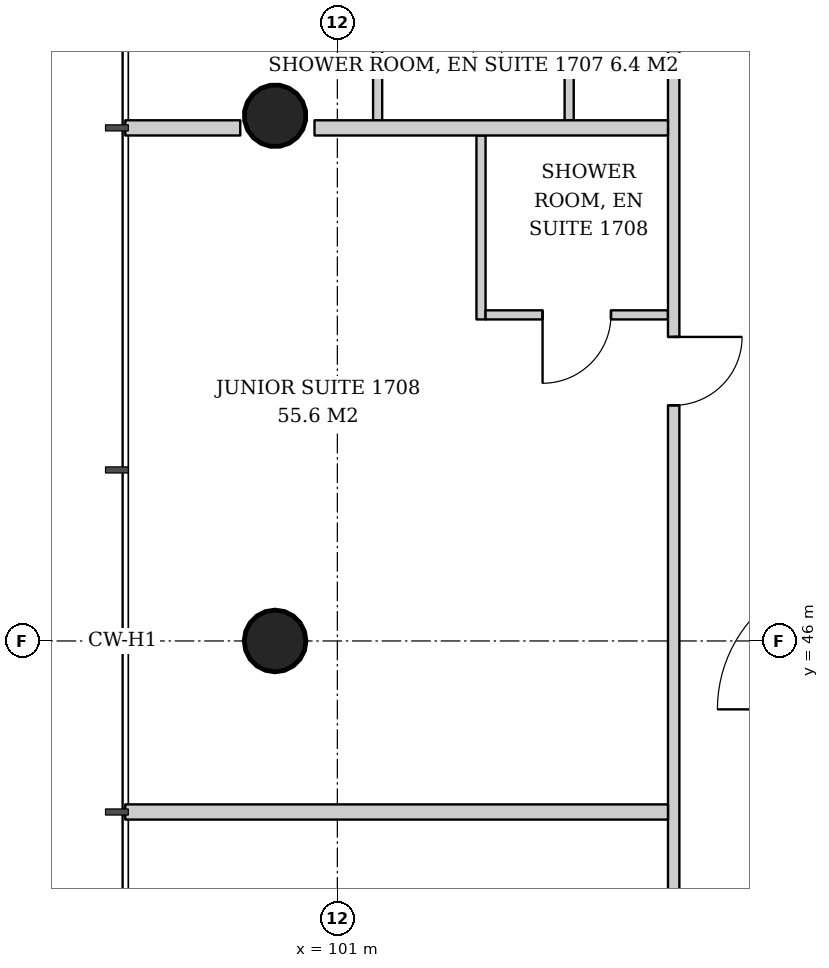
"""IFC4 building model, lengths in metres.
Left out: names, types, materials, properties, quantities, classifications, styles, units other than length and angle.
Written with IfcOpenShell. Run it as: python <this file> out.ifc"""

import sys

from ifc_helpers import new_model, si_unit, direction, frame, frame_2d, origin, origin_2d, place, context, subcontext, project, spatial, rectangle, hollow_circle, extrude, element, fill, save


model = new_model("IFC4")
c1 = context("Model", 3, precision=1e-05, world=origin(), true_north=direction((0.0, 1.0)))
c2 = subcontext(c1, "Body", "Model", "MODEL_VIEW")
j1 = project(units=[si_unit("LENGTHUNIT", "METRE"), si_unit("PLANEANGLEUNIT", "RADIAN")], contexts=[c1])
p1 = place(None, origin())
s1 = spatial("IfcSite", under=j1, at=p1, CompositionType="ELEMENT")
p2 = place(p1, origin())
s2 = spatial("IfcBuilding", under=s1, at=p2, CompositionType="ELEMENT")
p3 = place(p2, frame((0.0, 0.0, 70.4)))
s3 = spatial("IfcBuildingStorey", under=s2, at=p3, CompositionType="ELEMENT", Elevation=70.4)
p4 = place(p3, frame((100.129, 52.935, 0.0), z_axis=(0.043059584825, -0.021497706284, 0.998841188968), x_axis=(0.446680166538, 0.894693706707, 0.0)))
e1 = element("IfcColumn", 1, at=p4, inside=s3, PredefinedType="COLUMN", context=c2, shape_type="SweptSolid", body=[
    extrude(hollow_circle(Radius=0.406, WallThickness=0.03, at=origin_2d()), origin(), (0.0, 0.0, 1.0), 3.804),
])
p5 = place(p3, frame((100.129, 46.0, 0.0), z_axis=(0.043069538298, 0.0, 0.999072076915), x_axis=(0.0, 1.0, 0.0)))
e2 = element("IfcColumn", 2, at=p5, inside=s3, PredefinedType="COLUMN", context=c2, shape_type="SweptSolid", body=[
    extrude(hollow_circle(Radius=0.406, WallThickness=0.03, at=origin_2d()), origin(), (0.0, 0.0, 1.0), 3.803),
])
p6 = place(p3, frame((104.05, 52.85, 0.0), z_axis=(0.0, 0.0, 1.0), x_axis=(0.0, 1.0, 0.0)))
e3 = element("IfcWall", 3, at=p6, inside=s3, PredefinedType="PARTITIONING", context=c2, shape_type="SweptSolid", body=[
    extrude(rectangle(XDim=2.58, YDim=0.12, at=frame_2d((1.29, 0.0))), origin(), (0.0, 0.0, 1.0), 2.8),
])
p7 = place(p6, frame((0.75, 0.0, 0.0)))
e4 = element("IfcOpeningElement", 4, at=p7, cuts=e3, PredefinedType="OPENING", context=c2, shape_type="SweptSolid", body=[
    extrude(rectangle(XDim=0.9, YDim=2.1, at=frame_2d((0.45, 1.05))), frame((0.0, 0.07, 0.0), z_axis=(0.0, -1.0, 0.0), x_axis=(1.0, 0.0, 0.0)), (0.0, 0.0, 1.0), 0.14),
])
p8 = place(p3, frame((101.53, 52.85, 0.0), z_axis=(0.0, 0.0, 1.0), x_axis=(0.0, 1.0, 0.0)))
e5 = element("IfcWall", 5, at=p8, inside=s3, PredefinedType="PARTITIONING", context=c2, shape_type="SweptSolid", body=[
    extrude(rectangle(XDim=2.58, YDim=0.12, at=frame_2d((1.29, 0.0))), origin(), (0.0, 0.0, 1.0), 2.8),
])
p9 = place(p3, frame((102.89, 52.65, 0.0), z_axis=(0.0, 0.0, 1.0), x_axis=(0.0, -1.0, 0.0)))
e6 = element("IfcWall", 6, at=p9, inside=s3, PredefinedType="PARTITIONING", context=c2, shape_type="SweptSolid", body=[
    extrude(rectangle(XDim=2.42, YDim=0.12, at=frame_2d((1.21, 0.0))), origin(), (0.0, 0.0, 1.0), 2.847),
])
p10 = place(p3, frame((105.35, 50.29, 0.0), z_axis=(0.0, 0.0, 1.0), x_axis=(-1.0, 0.0, 0.0)))
e7 = element("IfcWall", 7, at=p10, inside=s3, PredefinedType="PARTITIONING", context=c2, shape_type="SweptSolid", body=[
    extrude(rectangle(XDim=2.4, YDim=0.12, at=frame_2d((1.2, 0.0))), origin(), (0.0, 0.0, 1.0), 3.6),
])
p11 = place(p10, frame((0.75, 0.0, 0.0)))
e8 = element("IfcOpeningElement", 8, at=p11, cuts=e7, PredefinedType="OPENING", context=c2, shape_type="SweptSolid", body=[
    extrude(rectangle(XDim=0.9, YDim=2.1, at=frame_2d((0.45, 1.05))), frame((0.0, 0.07, 0.0), z_axis=(0.0, -1.0, 0.0), x_axis=(1.0, 0.0, 0.0)), (0.0, 0.0, 1.0), 0.14),
])
p12 = place(p3, frame((105.425, 57.65, 0.0), z_axis=(0.0, 0.0, 1.0), x_axis=(0.0, -1.0, 0.0)))
e9 = element("IfcWall", 9, at=p12, inside=s3, PredefinedType="PARTITIONING", context=c2, shape_type="SweptSolid", body=[
    extrude(rectangle(XDim=23.15, YDim=0.15, at=frame_2d((11.575, 0.0))), origin(), (0.0, 0.0, 1.0), 2.8),
])
p13 = place(p12, frame((2.025, 0.0, 0.0)))
e10 = element("IfcOpeningElement", 10, at=p13, cuts=e9, PredefinedType="OPENING", context=c2, shape_type="SweptSolid", body=[
    extrude(rectangle(XDim=0.9, YDim=2.1, at=frame_2d((0.45, 1.05))), frame((0.0, 0.085, 0.0), z_axis=(0.0, -1.0, 0.0), x_axis=(1.0, 0.0, 0.0)), (0.0, 0.0, 1.0), 0.17),
])
p14 = place(p12, frame((7.65, 0.0, 0.0)))
e11 = element("IfcOpeningElement", 11, at=p14, cuts=e9, PredefinedType="OPENING", context=c2, shape_type="SweptSolid", body=[
    extrude(rectangle(XDim=0.9, YDim=2.1, at=frame_2d((0.45, 1.05))), frame((0.0, 0.085, 0.0), z_axis=(0.0, -1.0, 0.0), x_axis=(1.0, 0.0, 0.0)), (0.0, 0.0, 1.0), 0.17),
])
p15 = place(p12, frame((16.6, 0.0, 0.0)))
e12 = element("IfcOpeningElement", 12, at=p15, cuts=e9, PredefinedType="OPENING", context=c2, shape_type="SweptSolid", body=[
    extrude(rectangle(XDim=1.0, YDim=2.1, at=frame_2d((0.5, 1.05))), frame((0.0, 0.085, 0.0), z_axis=(0.0, -1.0, 0.0), x_axis=(1.0, 0.0, 0.0)), (0.0, 0.0, 1.0), 0.17),
])
p16 = place(p3, frame((105.35, 52.75, 0.0), z_axis=(0.0, 0.0, 1.0), x_axis=(-1.0, 0.0, 0.0)))
e13 = element("IfcWall", 13, at=p16, inside=s3, PredefinedType="PARTITIONING", context=c2, shape_type="SweptSolid", body=[
    extrude(rectangle(XDim=4.65, YDim=0.2, at=frame_2d((2.325, 0.0))), origin(), (0.0, 0.0, 1.0), 3.6),
])
p17 = place(p3, frame((99.723, 52.75, 0.0), z_axis=(0.0, 0.0, 1.0), x_axis=(-1.0, 0.0, 0.0)))
e14 = element("IfcWall", 14, at=p17, inside=s3, PredefinedType="PARTITIONING", context=c2, shape_type="SweptSolid", body=[
    extrude(rectangle(XDim=1.513, YDim=0.2, at=frame_2d((0.756, 0.0))), origin(), (0.0, 0.0, 1.0), 3.6),
])
p18 = place(p3, frame((105.35, 43.75, 0.0), z_axis=(0.0, 0.0, 1.0), x_axis=(-1.0, 0.0, 0.0)))
e15 = element("IfcWall", 15, at=p18, inside=s3, PredefinedType="PARTITIONING", context=c2, shape_type="SweptSolid", body=[
    extrude(rectangle(XDim=7.14, YDim=0.2, at=frame_2d((3.57, 0.0))), origin(), (0.0, 0.0, 1.0), 3.05),
])
p19 = place(p7, origin())
e16 = element("IfcDoor", 16, at=p19, inside=s3, OperationType="SINGLE_SWING_LEFT", PredefinedType="DOOR", context=c2, shape_type="SweptSolid", body=[
    extrude(rectangle(XDim=0.9, YDim=2.1, at=frame_2d((0.45, 1.05))), frame((0.0, 0.025, 0.0), z_axis=(0.0, -1.0, 0.0), x_axis=(1.0, 0.0, 0.0)), (0.0, 0.0, 1.0), 0.05),
])
fill(e4, e16)
p20 = place(p11, origin())
e17 = element("IfcDoor", 17, at=p20, inside=s3, OperationType="SINGLE_SWING_RIGHT", PredefinedType="DOOR", context=c2, shape_type="SweptSolid", body=[
    extrude(rectangle(XDim=0.9, YDim=2.1, at=frame_2d((0.45, 1.05))), frame((0.0, 0.025, 0.0), z_axis=(0.0, -1.0, 0.0), x_axis=(1.0, 0.0, 0.0)), (0.0, 0.0, 1.0), 0.05),
])
fill(e8, e17)
p21 = place(p14, origin())
e18 = element("IfcDoor", 18, at=p21, inside=s3, OperationType="SINGLE_SWING_LEFT", PredefinedType="DOOR", context=c2, shape_type="SweptSolid", body=[
    extrude(rectangle(XDim=0.9, YDim=2.1, at=frame_2d((0.45, 1.05))), frame((0.0, 0.025, 0.0), z_axis=(0.0, -1.0, 0.0), x_axis=(1.0, 0.0, 0.0)), (0.0, 0.0, 1.0), 0.05),
])
fill(e11, e18)
save(model, sys.argv[1])
